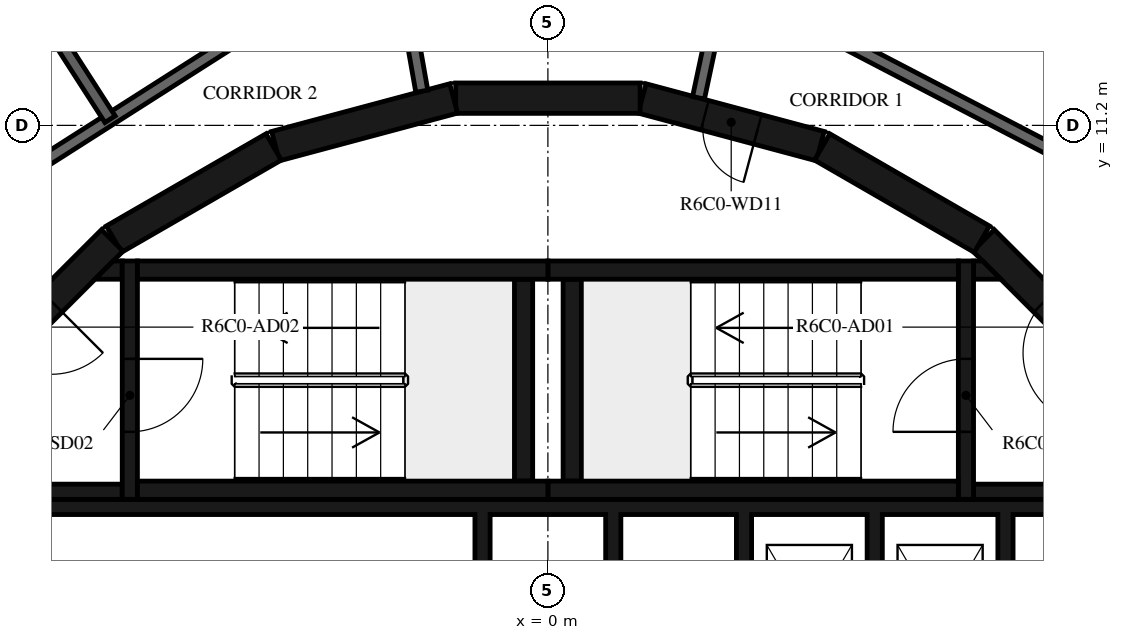
"""IFC4 building model, lengths in metres.
Left out: names, types, materials, properties, quantities, classifications, styles, units other than length and angle.
Written with IfcOpenShell. Run it as: python <this file> out.ifc"""

import sys

from ifc_helpers import new_model, si_unit, direction, frame, frame_2d, origin, place, context, subcontext, project, spatial, polyline, rectangle, outline, extrude, element, fill, save


model = new_model("IFC4")
c1 = context("Model", 3, precision=1e-05, world=origin(), true_north=direction((0.0, 1.0)))
c2 = subcontext(c1, "Body", "Model", "MODEL_VIEW")
j1 = project(units=[si_unit("LENGTHUNIT", "METRE"), si_unit("PLANEANGLEUNIT", "RADIAN")], contexts=[c1])
p1 = place(None, origin())
s1 = spatial("IfcSite", under=j1, at=p1, CompositionType="ELEMENT")
p2 = place(p1, origin())
s2 = spatial("IfcBuilding", under=s1, at=p2, CompositionType="ELEMENT")
p3 = place(p2, frame((0.0, 0.0, 247.7)))
s3 = spatial("IfcBuildingStorey", under=s2, at=p3, CompositionType="ELEMENT", Elevation=247.7)
p4 = place(p3, frame((9.308, 7.164, 0.0), z_axis=(0.0, 0.0, 1.0), x_axis=(-0.707106781187, 0.707106781187, 0.0)))
e1 = element("IfcWall", 1, at=p4, inside=s3, PredefinedType="SHEAR", context=c2, shape_type="SweptSolid", body=[
    extrude(rectangle(XDim=3.032, YDim=0.5, at=frame_2d((1.516, 0.0))), origin(), (0.0, 0.0, 1.0), 3.12),
])
p5 = place(p4, frame((0.416, 0.0, 0.0)))
e2 = element("IfcOpeningElement", 2, at=p5, cuts=e1, PredefinedType="OPENING", context=c2, shape_type="SweptSolid", body=[
    extrude(rectangle(XDim=1.2, YDim=2.1, at=frame_2d((0.6, 1.05))), frame((0.0, 0.26, 0.0), z_axis=(0.0, -1.0, 0.0), x_axis=(1.0, 0.0, 0.0)), (0.0, 0.0, 1.0), 0.52),
])
p6 = place(p3, frame((7.137, 9.329, 0.0), z_axis=(0.0, 0.0, 1.0), x_axis=(-0.865975092491, 0.500087131594, 0.0)))
e3 = element("IfcWall", 3, at=p6, inside=s3, PredefinedType="SHEAR", context=c2, shape_type="SweptSolid", body=[
    extrude(rectangle(XDim=3.033, YDim=0.5, at=frame_2d((1.516, 0.0))), origin(), (0.0, 0.0, 1.0), 3.12),
])
p7 = place(p3, frame((4.479, 10.858, 0.0), z_axis=(0.0, 0.0, 1.0), x_axis=(-0.965948410781, 0.258734743916, 0.0)))
e4 = element("IfcWall", 4, at=p7, inside=s3, PredefinedType="SHEAR", context=c2, shape_type="SweptSolid", body=[
    extrude(rectangle(XDim=3.033, YDim=0.5, at=frame_2d((1.516, 0.0))), origin(), (0.0, 0.0, 1.0), 3.12),
])
p8 = place(p7, frame((1.066, 0.0, 0.0)))
e5 = element("IfcOpeningElement", 5, at=p8, cuts=e4, PredefinedType="OPENING", context=c2, shape_type="SweptSolid", body=[
    extrude(rectangle(XDim=0.9, YDim=2.1, at=frame_2d((0.45, 1.05))), frame((0.0, 0.26, 0.0), z_axis=(0.0, -1.0, 0.0), x_axis=(1.0, 0.0, 0.0)), (0.0, 0.0, 1.0), 0.52),
])
for number, where, z_axis, x_axis in (
    (6, (1.516, 11.647, 0.0), (0.0, 0.0, 1.0), (-1.0, 0.0, 0.0)),
    (7, (-1.55, 11.643, 0.0), (0.0, 0.0, 1.0), (-0.966, -0.259, 0.0)),
    (8, (-4.51, 10.845, 0.0), (0.0, 0.0, 1.0), (-0.866, -0.5, 0.0)),
):
    element("IfcWall", number, at=place(p3, frame(where, z_axis=z_axis, x_axis=x_axis)), inside=s3, PredefinedType="SHEAR", context=c2, shape_type="SweptSolid", body=[
        extrude(rectangle(XDim=3.033, YDim=0.5, at=frame_2d((1.516, 0.0))), origin(), (0.0, 0.0, 1.0), 3.12),
    ])
p9 = place(p3, frame((-7.164, 9.308, 0.0), z_axis=(0.0, 0.0, 1.0), x_axis=(-0.707106781187, -0.707106781187, 0.0)))
e9 = element("IfcWall", 9, at=p9, inside=s3, PredefinedType="SHEAR", context=c2, shape_type="SweptSolid", body=[
    extrude(rectangle(XDim=3.032, YDim=0.5, at=frame_2d((1.516, 0.0))), origin(), (0.0, 0.0, 1.0), 3.12),
])
p10 = place(p9, frame((1.416, 0.0, 0.0)))
e10 = element("IfcOpeningElement", 10, at=p10, cuts=e9, PredefinedType="OPENING", context=c2, shape_type="SweptSolid", body=[
    extrude(rectangle(XDim=1.2, YDim=2.1, at=frame_2d((0.6, 1.05))), frame((0.0, 0.26, 0.0), z_axis=(0.0, -1.0, 0.0), x_axis=(1.0, 0.0, 0.0)), (0.0, 0.0, 1.0), 0.52),
])
for number, where, z_axis, x_axis in (
    (11, (0.0, 5.2, 0.0), (0.0, 0.0, 1.0), (1.0, 0.0, 0.0)),
    (12, (0.0, 8.82, 0.0), (0.0, 0.0, 1.0), (1.0, 0.0, 0.0)),
):
    element("IfcWall", number, at=place(p3, frame(where, z_axis=z_axis, x_axis=x_axis)), inside=s3, PredefinedType="SHEAR", context=c2, shape_type="SweptSolid", body=[
        extrude(rectangle(XDim=6.75, YDim=0.3, at=frame_2d((3.375, 0.0))), origin(), (0.0, 0.0, 1.0), 3.12),
    ])
p11 = place(p3, frame((0.4, 5.35, 0.0), z_axis=(0.0, 0.0, 1.0), x_axis=(0.0, 1.0, 0.0)))
e13 = element("IfcWall", 13, at=p11, inside=s3, PredefinedType="SHEAR", context=c2, shape_type="SweptSolid", body=[
    extrude(rectangle(XDim=3.32, YDim=0.3, at=frame_2d((1.66, 0.0))), origin(), (0.0, 0.0, 1.0), 3.12),
])
p12 = place(p3, frame((6.875, 5.05, 0.0), z_axis=(0.0, 0.0, 1.0), x_axis=(0.0, 1.0, 0.0)))
e14 = element("IfcWall", 14, at=p12, inside=s3, PredefinedType="SHEAR", context=c2, shape_type="SweptSolid", body=[
    extrude(rectangle(XDim=3.92, YDim=0.25, at=frame_2d((1.96, 0.0))), origin(), (0.0, 0.0, 1.0), 3.12),
])
p13 = place(p12, frame((1.11, 0.0, 0.0)))
e15 = element("IfcOpeningElement", 15, at=p13, cuts=e14, PredefinedType="OPENING", context=c2, shape_type="SweptSolid", body=[
    extrude(rectangle(XDim=1.2, YDim=2.1, at=frame_2d((0.6, 1.05))), frame((0.0, 0.135, 0.0), z_axis=(0.0, -1.0, 0.0), x_axis=(1.0, 0.0, 0.0)), (0.0, 0.0, 1.0), 0.27),
])
p14 = place(p3, frame((7.0, 5.175, 0.0), z_axis=(0.0, 0.0, 1.0), x_axis=(1.0, 0.0, 0.0)))
e16 = element("IfcWall", 16, at=p14, inside=s3, PredefinedType="SHEAR", context=c2, shape_type="SweptSolid", body=[
    extrude(rectangle(XDim=3.1, YDim=0.25, at=frame_2d((1.55, 0.0))), origin(), (0.0, 0.0, 1.0), 3.12),
])
p15 = place(p3, origin())
e17 = element("IfcWall", 17, at=p15, inside=s3, PredefinedType="SHEAR", context=c2, shape_type="SweptSolid", body=[
    extrude(outline(polyline([(7.448, 8.67), (7.0, 8.67), (7.0, 8.97), (7.148, 8.97), (7.448, 8.67)])), origin(), (0.0, 0.0, 1.0), 3.12),
])
for number, where, z_axis, x_axis in (
    (18, (-6.75, 5.2, 0.0), (0.0, 0.0, 1.0), (1.0, 0.0, 0.0)),
    (19, (-6.75, 8.82, 0.0), (0.0, 0.0, 1.0), (1.0, 0.0, 0.0)),
):
    element("IfcWall", number, at=place(p3, frame(where, z_axis=z_axis, x_axis=x_axis)), inside=s3, PredefinedType="SHEAR", context=c2, shape_type="SweptSolid", body=[
        extrude(rectangle(XDim=6.75, YDim=0.3, at=frame_2d((3.375, 0.0))), origin(), (0.0, 0.0, 1.0), 3.12),
    ])
p16 = place(p3, frame((-0.4, 5.35, 0.0), z_axis=(0.0, 0.0, 1.0), x_axis=(0.0, 1.0, 0.0)))
e20 = element("IfcWall", 20, at=p16, inside=s3, PredefinedType="SHEAR", context=c2, shape_type="SweptSolid", body=[
    extrude(rectangle(XDim=3.32, YDim=0.3, at=frame_2d((1.66, 0.0))), origin(), (0.0, 0.0, 1.0), 3.12),
])
p17 = place(p3, frame((-6.875, 8.97, 0.0), z_axis=(0.0, 0.0, 1.0), x_axis=(0.0, -1.0, 0.0)))
e21 = element("IfcWall", 21, at=p17, inside=s3, PredefinedType="SHEAR", context=c2, shape_type="SweptSolid", body=[
    extrude(rectangle(XDim=3.92, YDim=0.25, at=frame_2d((1.96, 0.0))), origin(), (0.0, 0.0, 1.0), 3.12),
])
p18 = place(p17, frame((1.61, 0.0, 0.0)))
e22 = element("IfcOpeningElement", 22, at=p18, cuts=e21, PredefinedType="OPENING", context=c2, shape_type="SweptSolid", body=[
    extrude(rectangle(XDim=1.2, YDim=2.1, at=frame_2d((0.6, 1.05))), frame((0.0, 0.135, 0.0), z_axis=(0.0, -1.0, 0.0), x_axis=(1.0, 0.0, 0.0)), (0.0, 0.0, 1.0), 0.27),
])
p19 = place(p3, frame((-7.0, 5.175, 0.0), z_axis=(0.0, 0.0, 1.0), x_axis=(-1.0, 0.0, 0.0)))
e23 = element("IfcWall", 23, at=p19, inside=s3, PredefinedType="SHEAR", context=c2, shape_type="SweptSolid", body=[
    extrude(rectangle(XDim=3.1, YDim=0.25, at=frame_2d((1.55, 0.0))), origin(), (0.0, 0.0, 1.0), 3.12),
])
p20 = place(p3, origin())
e24 = element("IfcWall", 24, at=p20, inside=s3, PredefinedType="SHEAR", context=c2, shape_type="SweptSolid", body=[
    extrude(outline(polyline([(-7.148, 8.97), (-7.0, 8.97), (-7.0, 8.67), (-7.448, 8.67), (-7.148, 8.97)])), origin(), (0.0, 0.0, 1.0), 3.12),
])
p21 = place(p3, origin())
e25 = element("IfcWall", 25, at=p21, inside=s3, PredefinedType="SHEAR", context=c2, shape_type="SweptSolid", body=[
    extrude(outline(polyline([(-9.55, 4.8), (-1.2, 4.8), (-1.2, 1.9), (-0.95, 1.9), (-0.95, 4.8), (0.95, 4.8), (0.95, 1.9), (1.2, 1.9), (1.2, 4.8), (3.1, 4.8), (3.1, 1.9), (3.35, 1.9), (3.35, 4.8), (5.25, 4.8), (5.25, 1.9), (5.5, 1.9), (5.5, 4.8), (7.4, 4.8), (7.4, 1.9), (7.65, 1.9), (7.65, 4.8), (9.55, 4.8), (9.55, 1.9), (9.8, 1.9), (9.8, 4.8), (9.8, 5.05), (-9.8, 5.05), (-9.8, 4.8), (-9.8, 1.9), (-9.55, 1.9), (-9.55, 4.8)])), origin(), (0.0, 0.0, 1.0), 3.12),
])
p22 = place(p3, frame((9.372, 10.228, 0.0), z_axis=(0.0, 0.0, 1.0), x_axis=(-0.887005184532, 0.461759464021, 0.0)))
e26 = element("IfcWall", 26, at=p22, inside=s3, PredefinedType="STANDARD", context=c2, shape_type="SweptSolid", body=[
    extrude(rectangle(XDim=7.181, YDim=0.2, at=frame_2d((3.591, 0.0))), origin(), (0.0, 0.0, 1.0), 3.12),
])
p23 = place(p3, frame((2.878, 13.538, 0.0), z_axis=(0.0, 0.0, 1.0), x_axis=(-0.207893604596, -0.978151444904, 0.0)))
e27 = element("IfcWall", 27, at=p23, inside=s3, PredefinedType="STANDARD", context=c2, shape_type="SweptSolid", body=[
    extrude(rectangle(XDim=1.927, YDim=0.2, at=frame_2d((0.963, 0.0))), origin(), (0.0, 0.0, 1.0), 3.12),
])
p24 = place(p3, frame((-2.074, 11.761, 0.0), z_axis=(0.0, 0.0, 1.0), x_axis=(-0.173679082312, 0.984802303189, 0.0)))
e28 = element("IfcWall", 28, at=p24, inside=s3, PredefinedType="STANDARD", context=c2, shape_type="SweptSolid", body=[
    extrude(rectangle(XDim=1.573, YDim=0.2, at=frame_2d((0.787, 0.0))), origin(), (0.0, 0.0, 1.0), 3.12),
])
p25 = place(p3, frame((-4.172, 13.231, 0.0), z_axis=(0.0, 0.0, 1.0), x_axis=(-0.843388394728, -0.537304397561, 0.0)))
e29 = element("IfcWall", 29, at=p25, inside=s3, PredefinedType="STANDARD", context=c2, shape_type="SweptSolid", body=[
    extrude(rectangle(XDim=7.181, YDim=0.2, at=frame_2d((3.59, 0.0))), origin(), (0.0, 0.0, 1.0), 3.12),
])
p26 = place(p3, frame((-9.69, 15.171, 0.0), z_axis=(0.0, 0.0, 1.0), x_axis=(0.540961372678, -0.841047438181, 0.0)))
e30 = element("IfcWall", 30, at=p26, inside=s3, PredefinedType="STANDARD", context=c2, shape_type="SweptSolid", body=[
    extrude(rectangle(XDim=4.602, YDim=0.2, at=frame_2d((2.301, 0.0))), origin(), (0.0, 0.0, 1.0), 3.12),
])
p27 = place(p3, frame((10.421, 11.373, 0.0), z_axis=(0.0, 0.0, 1.0), x_axis=(-0.887012970857, 0.461744506769, 0.0)))
e31 = element("IfcWall", 31, at=p27, inside=s3, PredefinedType="PARTITIONING", context=c2, shape_type="SweptSolid", body=[
    extrude(rectangle(XDim=7.985, YDim=0.12, at=frame_2d((3.992, 0.0))), origin(), (0.0, 0.0, 1.0), 3.12),
])
p28 = place(p27, frame((5.448, 0.0, 0.0)))
e32 = element("IfcOpeningElement", 32, at=p28, cuts=e31, PredefinedType="OPENING", context=c2, shape_type="SweptSolid", body=[
    extrude(rectangle(XDim=0.9, YDim=2.1, at=frame_2d((0.45, 1.05))), frame((0.0, 0.07, 0.0), z_axis=(0.0, -1.0, 0.0), x_axis=(1.0, 0.0, 0.0)), (0.0, 0.0, 1.0), 0.14),
])
p29 = place(p13, origin())
e33 = element("IfcDoor", 33, at=p29, inside=s3, OperationType="SINGLE_SWING_LEFT", PredefinedType="DOOR", context=c2, shape_type="SweptSolid", body=[
    extrude(rectangle(XDim=1.2, YDim=2.1, at=frame_2d((0.6, 1.05))), frame((0.0, 0.025, 0.0), z_axis=(0.0, -1.0, 0.0), x_axis=(1.0, 0.0, 0.0)), (0.0, 0.0, 1.0), 0.05),
])
fill(e15, e33)
p30 = place(p5, origin())
e34 = element("IfcDoor", 34, at=p30, inside=s3, OperationType="SINGLE_SWING_RIGHT", PredefinedType="DOOR", context=c2, shape_type="SweptSolid", body=[
    extrude(rectangle(XDim=1.2, YDim=2.1, at=frame_2d((0.6, 1.05))), frame((0.0, 0.025, 0.0), z_axis=(0.0, -1.0, 0.0), x_axis=(1.0, 0.0, 0.0)), (0.0, 0.0, 1.0), 0.05),
])
fill(e2, e34)
p31 = place(p18, origin())
e35 = element("IfcDoor", 35, at=p31, inside=s3, OperationType="SINGLE_SWING_LEFT", PredefinedType="DOOR", context=c2, shape_type="SweptSolid", body=[
    extrude(rectangle(XDim=1.2, YDim=2.1, at=frame_2d((0.6, 1.05))), frame((0.0, 0.025, 0.0), z_axis=(0.0, -1.0, 0.0), x_axis=(1.0, 0.0, 0.0)), (0.0, 0.0, 1.0), 0.05),
])
fill(e22, e35)
p32 = place(p10, origin())
e36 = element("IfcDoor", 36, at=p32, inside=s3, OperationType="SINGLE_SWING_RIGHT", PredefinedType="DOOR", context=c2, shape_type="SweptSolid", body=[
    extrude(rectangle(XDim=1.2, YDim=2.1, at=frame_2d((0.6, 1.05))), frame((0.0, 0.025, 0.0), z_axis=(0.0, -1.0, 0.0), x_axis=(1.0, 0.0, 0.0)), (0.0, 0.0, 1.0), 0.05),
])
fill(e10, e36)
p33 = place(p8, origin())
e37 = element("IfcDoor", 37, at=p33, inside=s3, OperationType="SINGLE_SWING_LEFT", PredefinedType="DOOR", context=c2, shape_type="SweptSolid", body=[
    extrude(rectangle(XDim=0.9, YDim=2.1, at=frame_2d((0.45, 1.05))), frame((0.0, 0.025, 0.0), z_axis=(0.0, -1.0, 0.0), x_axis=(1.0, 0.0, 0.0)), (0.0, 0.0, 1.0), 0.05),
])
fill(e5, e37)
save(model, sys.argv[1])
